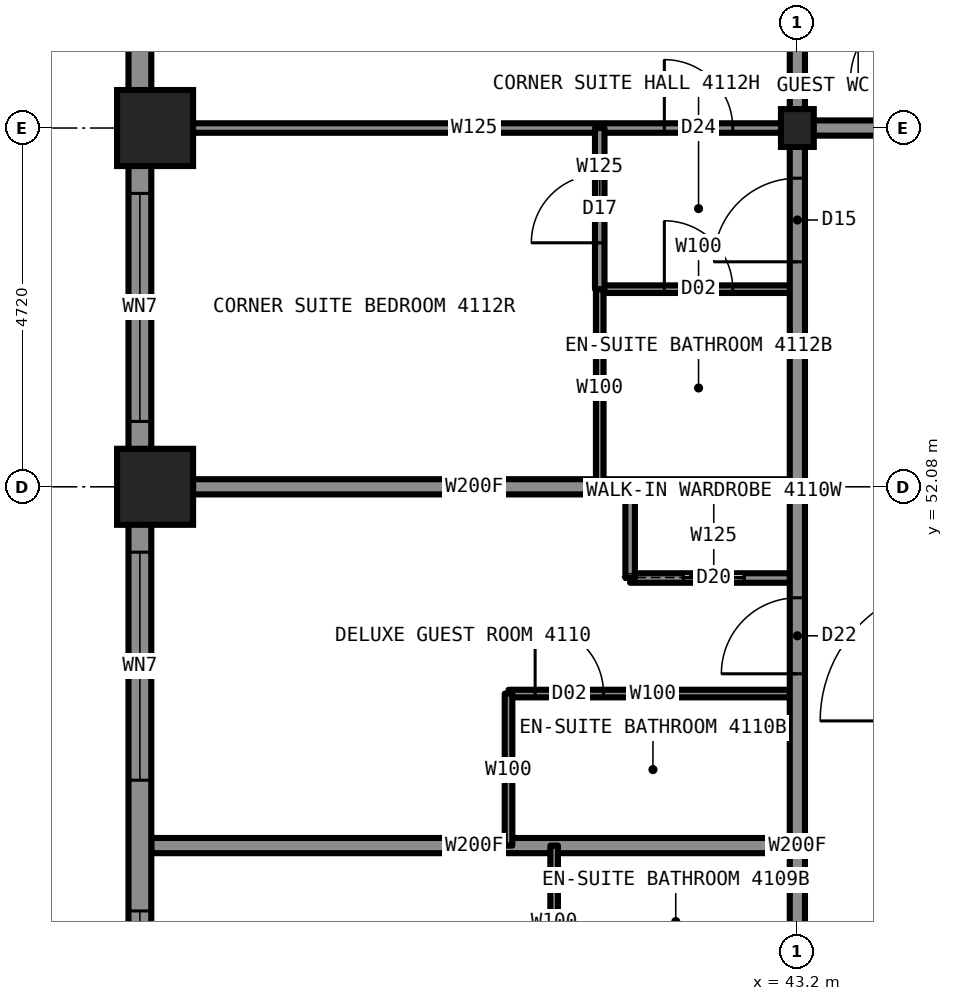
"""IFC4 building model, lengths in metres.
Left out: names, types, materials, properties, quantities, classifications, styles, units other than length and angle.
Written with IfcOpenShell. Run it as: python <this file> out.ifc"""

import sys

from ifc_helpers import new_model, si_unit, direction, frame, frame_2d, origin, origin_2d, place, context, subcontext, project, spatial, rectangle, i_section, extrude, element, fill, save


model = new_model("IFC4")
c1 = context("Model", 3, precision=1e-05, world=origin(), true_north=direction((0.0, 1.0)))
c2 = subcontext(c1, "Body", "Model", "MODEL_VIEW")
j1 = project(units=[si_unit("LENGTHUNIT", "METRE"), si_unit("PLANEANGLEUNIT", "RADIAN")], contexts=[c1])
p1 = place(None, origin())
s1 = spatial("IfcSite", under=j1, at=p1, CompositionType="ELEMENT")
p2 = place(p1, origin())
s2 = spatial("IfcBuilding", under=s1, at=p2, CompositionType="ELEMENT")
p3 = place(p2, frame((0.0, 0.0, 145.9)))
s3 = spatial("IfcBuildingStorey", under=s2, at=p3, CompositionType="ELEMENT", Elevation=145.9)
for number, where, z_axis, x_axis in (
    (1, (34.75, 52.08, 0.0), (0.0, 0.0, 1.0), (1.0, 0.0, 0.0)),
    (2, (34.75, 56.8, 0.0), (0.0, 0.0, 1.0), (1.0, 0.0, 0.0)),
):
    element("IfcColumn", number, at=place(p3, frame(where, z_axis=z_axis, x_axis=x_axis)), inside=s3, PredefinedType="COLUMN", context=c2, shape_type="SweptSolid", body=[
        extrude(i_section(OverallWidth=0.422, OverallDepth=0.465, WebThickness=0.045, FlangeThickness=0.073, at=origin_2d()), origin(), (0.0, 0.0, 1.0), 3.5),
    ])
p4 = place(p3, frame((43.2, 56.8, 0.0), z_axis=(0.0, 0.0, 1.0), x_axis=(1.0, 0.0, 0.0)))
e3 = element("IfcColumn", 3, at=p4, inside=s3, PredefinedType="COLUMN", context=c2, shape_type="SweptSolid", body=[
    extrude(i_section(OverallWidth=0.432, OverallDepth=0.498, WebThickness=0.056, FlangeThickness=0.089, at=origin_2d()), origin(), (0.0, 0.0, 1.0), 3.5),
])
p5 = place(p3, frame((43.2, 56.8, 0.0), z_axis=(0.0, 0.0, 1.0), x_axis=(1.0, 0.0, 0.0)))
e4 = element("IfcWall", 4, at=p5, inside=s3, PredefinedType="PARTITIONING", context=c2, shape_type="SweptSolid", body=[
    extrude(rectangle(XDim=23.6, YDim=0.2, at=frame_2d((11.8, 0.0))), origin(), (0.0, 0.0, 1.0), 3.33),
])
p6 = place(p5, frame((1.85, 0.0, 0.0)))
e5 = element("IfcOpeningElement", 5, at=p6, cuts=e4, PredefinedType="OPENING", context=c2, shape_type="SweptSolid", body=[
    extrude(rectangle(XDim=1.1, YDim=2.2, at=frame_2d((0.55, 1.1))), frame((0.0, 0.11, 0.0), z_axis=(0.0, -1.0, 0.0), x_axis=(1.0, 0.0, 0.0)), (0.0, 0.0, 1.0), 0.22),
])
p7 = place(p5, frame((17.16, 0.0, 0.0)))
e6 = element("IfcOpeningElement", 6, at=p7, cuts=e4, PredefinedType="OPENING", context=c2, shape_type="SweptSolid", body=[
    extrude(rectangle(XDim=1.0, YDim=2.2, at=frame_2d((0.5, 1.1))), frame((0.0, 0.11, 0.0), z_axis=(0.0, -1.0, 0.0), x_axis=(1.0, 0.0, 0.0)), (0.0, 0.0, 1.0), 0.22),
])
p8 = place(p3, frame((34.7, 56.8, 0.0), z_axis=(0.0, 0.0, 1.0), x_axis=(1.0, 0.0, 0.0)))
e7 = element("IfcWall", 7, at=p8, inside=s3, PredefinedType="PARTITIONING", context=c2, shape_type="SweptSolid", body=[
    extrude(rectangle(XDim=8.5, YDim=0.125, at=frame_2d((4.25, 0.0))), origin(), (0.0, 0.0, 1.0), 2.573),
])
p9 = place(p8, frame((6.75, 0.0, 0.0)))
e8 = element("IfcOpeningElement", 8, at=p9, cuts=e7, PredefinedType="OPENING", context=c2, shape_type="SweptSolid", body=[
    extrude(rectangle(XDim=0.9, YDim=2.2, at=frame_2d((0.45, 1.1))), frame((0.0, 0.073, 0.0), z_axis=(0.0, -1.0, 0.0), x_axis=(1.0, 0.0, 0.0)), (0.0, 0.0, 1.0), 0.145),
])
p10 = place(p3, frame((34.7, 47.36, 0.0), z_axis=(0.0, 0.0, 1.0), x_axis=(1.0, 0.0, 0.0)))
e9 = element("IfcWall", 9, at=p10, inside=s3, PredefinedType="PARTITIONING", context=c2, shape_type="SweptSolid", body=[
    extrude(rectangle(XDim=7.9, YDim=0.2, at=frame_2d((3.95, 0.0))), origin(), (0.0, 0.0, 1.0), 2.731),
])
p11 = place(p3, frame((38.8, 49.36, 0.0), z_axis=(0.0, 0.0, 1.0), x_axis=(1.0, 0.0, 0.0)))
e10 = element("IfcWall", 10, at=p11, inside=s3, PredefinedType="PARTITIONING", context=c2, shape_type="SweptSolid", body=[
    extrude(rectangle(XDim=3.8, YDim=0.1, at=frame_2d((1.9, 0.0))), origin(), (0.0, 0.0, 1.0), 3.33),
])
p12 = place(p11, frame((0.35, 0.0, 0.0)))
e11 = element("IfcOpeningElement", 11, at=p12, cuts=e10, PredefinedType="OPENING", context=c2, shape_type="SweptSolid", body=[
    extrude(rectangle(XDim=0.9, YDim=2.1, at=frame_2d((0.45, 1.05))), frame((0.0, 0.06, 0.0), z_axis=(0.0, -1.0, 0.0), x_axis=(1.0, 0.0, 0.0)), (0.0, 0.0, 1.0), 0.12),
])
p13 = place(p3, frame((40.4, 50.88, 0.0), z_axis=(0.0, 0.0, 1.0), x_axis=(1.0, 0.0, 0.0)))
e12 = element("IfcWall", 12, at=p13, inside=s3, PredefinedType="PARTITIONING", context=c2, shape_type="SweptSolid", body=[
    extrude(rectangle(XDim=2.2, YDim=0.125, at=frame_2d((1.1, 0.0))), origin(), (0.0, 0.0, 1.0), 3.33),
])
p14 = place(p13, frame((0.7, 0.0, 0.0)))
e13 = element("IfcOpeningElement", 13, at=p14, cuts=e12, PredefinedType="OPENING", context=c2, shape_type="SweptSolid", body=[
    extrude(rectangle(XDim=0.8, YDim=2.1, at=frame_2d((0.4, 1.05))), frame((0.0, 0.073, 0.0), z_axis=(0.0, -1.0, 0.0), x_axis=(1.0, 0.0, 0.0)), (0.0, 0.0, 1.0), 0.145),
])
p15 = place(p3, frame((42.6, 52.08, 0.0), z_axis=(0.0, 0.0, 1.0), x_axis=(1.0, 0.0, 0.0)))
e14 = element("IfcWall", 14, at=p15, inside=s3, PredefinedType="PARTITIONING", context=c2, shape_type="SweptSolid", body=[
    extrude(rectangle(XDim=0.6, YDim=0.2, at=frame_2d((0.3, 0.0))), origin(), (0.0, 0.0, 1.0), 2.573),
])
p16 = place(p3, frame((34.7, 52.08, 0.0), z_axis=(0.0, 0.0, 1.0), x_axis=(1.0, 0.0, 0.0)))
e15 = element("IfcWall", 15, at=p16, inside=s3, PredefinedType="PARTITIONING", context=c2, shape_type="SweptSolid", body=[
    extrude(rectangle(XDim=5.7, YDim=0.2, at=frame_2d((2.85, 0.0))), origin(), (0.0, 0.0, 1.0), 2.573),
])
p17 = place(p3, frame((40.6, 52.08, 0.0), z_axis=(0.0, 0.0, 1.0), x_axis=(1.0, 0.0, 0.0)))
e16 = element("IfcWall", 16, at=p17, inside=s3, PredefinedType="PARTITIONING", context=c2, shape_type="SweptSolid", body=[
    extrude(rectangle(XDim=2.0, YDim=0.2, at=frame_2d((1.0, 0.0))), origin(), (0.0, 0.0, 1.0), 2.573),
])
p18 = place(p3, frame((40.6, 54.68, 0.0), z_axis=(0.0, 0.0, 1.0), x_axis=(1.0, 0.0, 0.0)))
e17 = element("IfcWall", 17, at=p18, inside=s3, PredefinedType="PARTITIONING", context=c2, shape_type="SweptSolid", body=[
    extrude(rectangle(XDim=2.6, YDim=0.1, at=frame_2d((1.3, 0.0))), origin(), (0.0, 0.0, 1.0), 3.33),
])
p19 = place(p18, frame((0.85, 0.0, 0.0)))
e18 = element("IfcOpeningElement", 18, at=p19, cuts=e17, PredefinedType="OPENING", context=c2, shape_type="SweptSolid", body=[
    extrude(rectangle(XDim=0.9, YDim=2.1, at=frame_2d((0.45, 1.05))), frame((0.0, 0.06, 0.0), z_axis=(0.0, -1.0, 0.0), x_axis=(1.0, 0.0, 0.0)), (0.0, 0.0, 1.0), 0.12),
])
p20 = place(p3, frame((43.2, 52.08, 0.0), z_axis=(0.0, 0.0, 1.0), x_axis=(0.0, 1.0, 0.0)))
e19 = element("IfcWall", 19, at=p20, inside=s3, PredefinedType="PARTITIONING", context=c2, shape_type="SweptSolid", body=[
    extrude(rectangle(XDim=4.72, YDim=0.2, at=frame_2d((2.36, 0.0))), origin(), (0.0, 0.0, 1.0), 3.33),
])
p21 = place(p20, frame((2.96, 0.0, 0.0)))
e20 = element("IfcOpeningElement", 20, at=p21, cuts=e19, PredefinedType="OPENING", context=c2, shape_type="SweptSolid", body=[
    extrude(rectangle(XDim=1.1, YDim=2.2, at=frame_2d((0.55, 1.1))), frame((0.0, 0.11, 0.0), z_axis=(0.0, -1.0, 0.0), x_axis=(1.0, 0.0, 0.0)), (0.0, 0.0, 1.0), 0.22),
])
p22 = place(p3, frame((43.2, 56.8, 0.0), z_axis=(0.0, 0.0, 1.0), x_axis=(0.0, 1.0, 0.0)))
e21 = element("IfcWall", 21, at=p22, inside=s3, PredefinedType="PARTITIONING", context=c2, shape_type="SweptSolid", body=[
    extrude(rectangle(XDim=8.5, YDim=0.2, at=frame_2d((4.25, 0.0))), origin(), (0.0, 0.0, 1.0), 2.573),
])
p23 = place(p3, frame((42.6, 37.92, 0.0), z_axis=(0.0, 0.0, 1.0), x_axis=(0.0, 1.0, 0.0)))
e22 = element("IfcWall", 22, at=p23, inside=s3, PredefinedType="PARTITIONING", context=c2, shape_type="SweptSolid", body=[
    extrude(rectangle(XDim=14.16, YDim=0.2, at=frame_2d((7.08, 0.0))), origin(), (0.0, 0.0, 1.0), 3.33),
])
p24 = place(p23, frame((1.46, 0.0, 0.0)))
e23 = element("IfcOpeningElement", 23, at=p24, cuts=e22, PredefinedType="OPENING", context=c2, shape_type="SweptSolid", body=[
    extrude(rectangle(XDim=1.0, YDim=2.2, at=frame_2d((0.5, 1.1))), frame((0.0, 0.11, 0.0), z_axis=(0.0, -1.0, 0.0), x_axis=(1.0, 0.0, 0.0)), (0.0, 0.0, 1.0), 0.22),
])
p25 = place(p23, frame((6.18, 0.0, 0.0)))
e24 = element("IfcOpeningElement", 24, at=p25, cuts=e22, PredefinedType="OPENING", context=c2, shape_type="SweptSolid", body=[
    extrude(rectangle(XDim=1.0, YDim=2.2, at=frame_2d((0.5, 1.1))), frame((0.0, 0.11, 0.0), z_axis=(0.0, -1.0, 0.0), x_axis=(1.0, 0.0, 0.0)), (0.0, 0.0, 1.0), 0.22),
])
p26 = place(p23, frame((11.7, 0.0, 0.0)))
e25 = element("IfcOpeningElement", 25, at=p26, cuts=e22, PredefinedType="OPENING", context=c2, shape_type="SweptSolid", body=[
    extrude(rectangle(XDim=1.0, YDim=2.2, at=frame_2d((0.5, 1.1))), frame((0.0, 0.11, 0.0), z_axis=(0.0, -1.0, 0.0), x_axis=(1.0, 0.0, 0.0)), (0.0, 0.0, 1.0), 0.22),
])
p27 = place(p3, frame((40.6, 52.08, 0.0), z_axis=(0.0, 0.0, 1.0), x_axis=(0.0, 1.0, 0.0)))
e26 = element("IfcWall", 26, at=p27, inside=s3, PredefinedType="PARTITIONING", context=c2, shape_type="SweptSolid", body=[
    extrude(rectangle(XDim=2.6, YDim=0.1, at=frame_2d((1.3, 0.0))), origin(), (0.0, 0.0, 1.0), 3.33),
])
p28 = place(p3, frame((40.6, 54.68, 0.0), z_axis=(0.0, 0.0, 1.0), x_axis=(0.0, 1.0, 0.0)))
e27 = element("IfcWall", 27, at=p28, inside=s3, PredefinedType="PARTITIONING", context=c2, shape_type="SweptSolid", body=[
    extrude(rectangle(XDim=2.12, YDim=0.125, at=frame_2d((1.06, 0.0))), origin(), (0.0, 0.0, 1.0), 3.33),
])
p29 = place(p28, frame((0.61, 0.0, 0.0)))
e28 = element("IfcOpeningElement", 28, at=p29, cuts=e27, PredefinedType="OPENING", context=c2, shape_type="SweptSolid", body=[
    extrude(rectangle(XDim=0.9, YDim=2.2, at=frame_2d((0.45, 1.1))), frame((0.0, 0.073, 0.0), z_axis=(0.0, -1.0, 0.0), x_axis=(1.0, 0.0, 0.0)), (0.0, 0.0, 1.0), 0.145),
])
p30 = place(p3, frame((40.4, 50.88, 0.0), z_axis=(0.0, 0.0, 1.0), x_axis=(0.0, 1.0, 0.0)))
e29 = element("IfcWall", 29, at=p30, inside=s3, PredefinedType="PARTITIONING", context=c2, shape_type="SweptSolid", body=[
    extrude(rectangle(XDim=1.2, YDim=0.125, at=frame_2d((0.6, 0.0))), origin(), (0.0, 0.0, 1.0), 3.33),
])
for number, where, z_axis, x_axis in (
    (30, (39.4, 45.36, 0.0), (0.0, 0.0, 1.0), (0.0, 1.0, 0.0)),
    (31, (38.8, 47.36, 0.0), (0.0, 0.0, 1.0), (0.0, 1.0, 0.0)),
):
    element("IfcWall", number, at=place(p3, frame(where, z_axis=z_axis, x_axis=x_axis)), inside=s3, PredefinedType="PARTITIONING", context=c2, shape_type="SweptSolid", body=[
        extrude(rectangle(XDim=2.0, YDim=0.1, at=frame_2d((1.0, 0.0))), origin(), (0.0, 0.0, 1.0), 3.33),
    ])
p31 = place(p3, frame((34.55, 60.1, 0.0), z_axis=(0.0, 0.0, 1.0), x_axis=(0.0, -1.0, 0.0)))
e32 = element("IfcWall", 32, at=p31, inside=s3, PredefinedType="SOLIDWALL", context=c2, shape_type="SweptSolid", body=[
    extrude(rectangle(XDim=30.2, YDim=0.3, at=frame_2d((15.1, 0.0))), origin(), (0.0, 0.0, 1.0), 2.83),
])
p32 = place(p31, frame((1.3, 0.0, 0.8)))
e33 = element("IfcOpeningElement", 33, at=p32, cuts=e32, PredefinedType="OPENING", context=c2, shape_type="SweptSolid", body=[
    extrude(rectangle(XDim=1.1, YDim=1.7, at=frame_2d((0.55, 0.85))), frame((0.0, 0.16, 0.0), z_axis=(0.0, -1.0, 0.0), x_axis=(1.0, 0.0, 0.0)), (0.0, 0.0, 1.0), 0.32),
])
p33 = place(p31, frame((4.16, 0.0, 0.5)))
e34 = element("IfcOpeningElement", 34, at=p33, cuts=e32, PredefinedType="OPENING", context=c2, shape_type="SweptSolid", body=[
    extrude(rectangle(XDim=3.0, YDim=2.0, at=frame_2d((1.5, 1.0))), frame((0.0, 0.16, 0.0), z_axis=(0.0, -1.0, 0.0), x_axis=(1.0, 0.0, 0.0)), (0.0, 0.0, 1.0), 0.32),
])
p34 = place(p31, frame((8.88, 0.0, 0.5)))
e35 = element("IfcOpeningElement", 35, at=p34, cuts=e32, PredefinedType="OPENING", context=c2, shape_type="SweptSolid", body=[
    extrude(rectangle(XDim=3.0, YDim=2.0, at=frame_2d((1.5, 1.0))), frame((0.0, 0.16, 0.0), z_axis=(0.0, -1.0, 0.0), x_axis=(1.0, 0.0, 0.0)), (0.0, 0.0, 1.0), 0.32),
])
p35 = place(p31, frame((13.6, 0.0, 0.5)))
e36 = element("IfcOpeningElement", 36, at=p35, cuts=e32, PredefinedType="OPENING", context=c2, shape_type="SweptSolid", body=[
    extrude(rectangle(XDim=3.0, YDim=2.0, at=frame_2d((1.5, 1.0))), frame((0.0, 0.16, 0.0), z_axis=(0.0, -1.0, 0.0), x_axis=(1.0, 0.0, 0.0)), (0.0, 0.0, 1.0), 0.32),
])
p36 = place(p31, frame((18.32, 0.0, 0.5)))
e37 = element("IfcOpeningElement", 37, at=p36, cuts=e32, PredefinedType="OPENING", context=c2, shape_type="SweptSolid", body=[
    extrude(rectangle(XDim=3.0, YDim=2.0, at=frame_2d((1.5, 1.0))), frame((0.0, 0.16, 0.0), z_axis=(0.0, -1.0, 0.0), x_axis=(1.0, 0.0, 0.0)), (0.0, 0.0, 1.0), 0.32),
])
p37 = place(p31, frame((23.04, 0.0, 0.5)))
e38 = element("IfcOpeningElement", 38, at=p37, cuts=e32, PredefinedType="OPENING", context=c2, shape_type="SweptSolid", body=[
    extrude(rectangle(XDim=3.0, YDim=2.0, at=frame_2d((1.5, 1.0))), frame((0.0, 0.16, 0.0), z_axis=(0.0, -1.0, 0.0), x_axis=(1.0, 0.0, 0.0)), (0.0, 0.0, 1.0), 0.32),
])
p38 = place(p31, frame((27.75, 0.0, 0.8)))
e39 = element("IfcOpeningElement", 39, at=p38, cuts=e32, PredefinedType="OPENING", context=c2, shape_type="SweptSolid", body=[
    extrude(rectangle(XDim=1.1, YDim=1.7, at=frame_2d((0.55, 0.85))), frame((0.0, 0.16, 0.0), z_axis=(0.0, -1.0, 0.0), x_axis=(1.0, 0.0, 0.0)), (0.0, 0.0, 1.0), 0.32),
])
p39 = place(p26, origin())
e40 = element("IfcDoor", 40, at=p39, inside=s3, OperationType="SINGLE_SWING_LEFT", PredefinedType="DOOR", context=c2, shape_type="SweptSolid", body=[
    extrude(rectangle(XDim=1.0, YDim=2.2, at=frame_2d((0.5, 1.1))), frame((0.0, 0.025, 0.0), z_axis=(0.0, -1.0, 0.0), x_axis=(1.0, 0.0, 0.0)), (0.0, 0.0, 1.0), 0.05),
])
fill(e25, e40)
p40 = place(p12, origin())
e41 = element("IfcDoor", 41, at=p40, inside=s3, OperationType="SINGLE_SWING_RIGHT", PredefinedType="DOOR", context=c2, shape_type="SweptSolid", body=[
    extrude(rectangle(XDim=0.9, YDim=2.1, at=frame_2d((0.45, 1.05))), frame((0.0, 0.025, 0.0), z_axis=(0.0, -1.0, 0.0), x_axis=(1.0, 0.0, 0.0)), (0.0, 0.0, 1.0), 0.05),
])
fill(e11, e41)
p41 = place(p14, origin())
e42 = element("IfcDoor", 42, at=p41, inside=s3, OperationType="SLIDING_TO_LEFT", PredefinedType="DOOR", context=c2, shape_type="SweptSolid", body=[
    extrude(rectangle(XDim=0.8, YDim=2.1, at=frame_2d((0.4, 1.05))), frame((0.0, 0.025, 0.0), z_axis=(0.0, -1.0, 0.0), x_axis=(1.0, 0.0, 0.0)), (0.0, 0.0, 1.0), 0.05),
])
fill(e13, e42)
p42 = place(p9, origin())
e43 = element("IfcDoor", 43, at=p42, inside=s3, OperationType="SINGLE_SWING_LEFT", PredefinedType="DOOR", context=c2, shape_type="SweptSolid", body=[
    extrude(rectangle(XDim=0.9, YDim=2.2, at=frame_2d((0.45, 1.1))), frame((0.0, 0.025, 0.0), z_axis=(0.0, -1.0, 0.0), x_axis=(1.0, 0.0, 0.0)), (0.0, 0.0, 1.0), 0.05),
])
fill(e8, e43)
p43 = place(p19, origin())
e44 = element("IfcDoor", 44, at=p43, inside=s3, OperationType="SINGLE_SWING_RIGHT", PredefinedType="DOOR", context=c2, shape_type="SweptSolid", body=[
    extrude(rectangle(XDim=0.9, YDim=2.1, at=frame_2d((0.45, 1.05))), frame((0.0, 0.025, 0.0), z_axis=(0.0, -1.0, 0.0), x_axis=(1.0, 0.0, 0.0)), (0.0, 0.0, 1.0), 0.05),
])
fill(e18, e44)
p44 = place(p21, origin())
e45 = element("IfcDoor", 45, at=p44, inside=s3, OperationType="SINGLE_SWING_LEFT", PredefinedType="DOOR", context=c2, shape_type="SweptSolid", body=[
    extrude(rectangle(XDim=1.1, YDim=2.2, at=frame_2d((0.55, 1.1))), frame((0.0, 0.025, 0.0), z_axis=(0.0, -1.0, 0.0), x_axis=(1.0, 0.0, 0.0)), (0.0, 0.0, 1.0), 0.05),
])
fill(e20, e45)
p45 = place(p29, origin())
e46 = element("IfcDoor", 46, at=p45, inside=s3, OperationType="SINGLE_SWING_LEFT", PredefinedType="DOOR", context=c2, shape_type="SweptSolid", body=[
    extrude(rectangle(XDim=0.9, YDim=2.2, at=frame_2d((0.45, 1.1))), frame((0.0, 0.025, 0.0), z_axis=(0.0, -1.0, 0.0), x_axis=(1.0, 0.0, 0.0)), (0.0, 0.0, 1.0), 0.05),
])
fill(e28, e46)
p46 = place(p32, origin())
e47 = element("IfcWindow", 47, at=p46, inside=s3, PartitioningType="SINGLE_PANEL", PredefinedType="WINDOW", context=c2, shape_type="SweptSolid", body=[
    extrude(rectangle(XDim=1.1, YDim=1.7, at=frame_2d((0.55, 0.85))), frame((0.0, 0.03, 0.0), z_axis=(0.0, -1.0, 0.0), x_axis=(1.0, 0.0, 0.0)), (0.0, 0.0, 1.0), 0.06),
])
fill(e33, e47)
p47 = place(p33, origin())
e48 = element("IfcWindow", 48, at=p47, inside=s3, PartitioningType="SINGLE_PANEL", PredefinedType="WINDOW", context=c2, shape_type="SweptSolid", body=[
    extrude(rectangle(XDim=3.0, YDim=2.0, at=frame_2d((1.5, 1.0))), frame((0.0, 0.03, 0.0), z_axis=(0.0, -1.0, 0.0), x_axis=(1.0, 0.0, 0.0)), (0.0, 0.0, 1.0), 0.06),
])
fill(e34, e48)
p48 = place(p34, origin())
e49 = element("IfcWindow", 49, at=p48, inside=s3, PartitioningType="SINGLE_PANEL", PredefinedType="WINDOW", context=c2, shape_type="SweptSolid", body=[
    extrude(rectangle(XDim=3.0, YDim=2.0, at=frame_2d((1.5, 1.0))), frame((0.0, 0.03, 0.0), z_axis=(0.0, -1.0, 0.0), x_axis=(1.0, 0.0, 0.0)), (0.0, 0.0, 1.0), 0.06),
])
fill(e35, e49)
p49 = place(p35, origin())
e50 = element("IfcWindow", 50, at=p49, inside=s3, PartitioningType="SINGLE_PANEL", PredefinedType="WINDOW", context=c2, shape_type="SweptSolid", body=[
    extrude(rectangle(XDim=3.0, YDim=2.0, at=frame_2d((1.5, 1.0))), frame((0.0, 0.03, 0.0), z_axis=(0.0, -1.0, 0.0), x_axis=(1.0, 0.0, 0.0)), (0.0, 0.0, 1.0), 0.06),
])
fill(e36, e50)
save(model, sys.argv[1])
